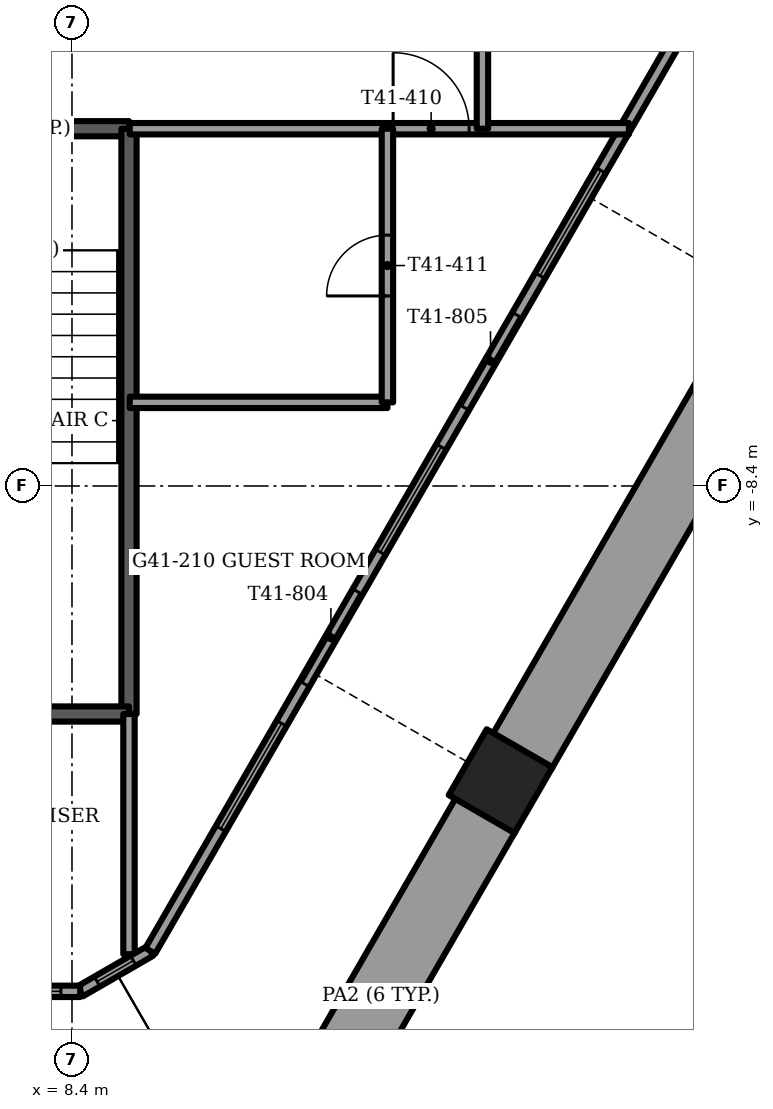
"""IFC4 building model, lengths in metres.
Left out: names, types, materials, properties, quantities, classifications, styles, units other than length and angle.
Written with IfcOpenShell. Run it as: python <this file> out.ifc"""

import sys

from ifc_helpers import new_model, si_unit, direction, frame, frame_2d, origin, origin_2d, place, context, subcontext, project, spatial, rectangle, extrude, element, fill, save


model = new_model("IFC4")
c1 = context("Model", 3, precision=1e-05, world=origin(), true_north=direction((0.0, 1.0)))
c2 = subcontext(c1, "Body", "Model", "MODEL_VIEW")
j1 = project(units=[si_unit("LENGTHUNIT", "METRE"), si_unit("PLANEANGLEUNIT", "RADIAN")], contexts=[c1])
p1 = place(None, origin())
s1 = spatial("IfcSite", under=j1, at=p1, CompositionType="ELEMENT")
p2 = place(p1, origin())
s2 = spatial("IfcBuilding", under=s1, at=p2, CompositionType="ELEMENT")
p3 = place(p2, frame((0.0, 0.0, 168.25)))
s3 = spatial("IfcBuildingStorey", under=s2, at=p3, CompositionType="ELEMENT", Elevation=168.25)
p4 = place(p3, frame((14.039, -12.283, -1.2), z_axis=(0.0, 0.0, 1.0), x_axis=(-0.5, -0.866025403784, 0.0)))
e1 = element("IfcColumn", 1, at=p4, inside=s3, PredefinedType="COLUMN", context=c2, shape_type="SweptSolid", body=[
    extrude(rectangle(XDim=1.0, YDim=1.0, at=origin_2d()), origin(), (0.0, 0.0, 1.0), 3.75),
])
p5 = place(p3, frame((11.083, -17.504, 0.0), z_axis=(0.0, 0.0, 1.0), x_axis=(0.499961976493, 0.866047355554, 0.0)))
e2 = element("IfcWall", 2, at=p5, inside=s3, PredefinedType="PARAPET", context=c2, shape_type="SweptSolid", body=[
    extrude(rectangle(XDim=5.529, YDim=0.9, at=frame_2d((2.765, 0.0))), origin(), (0.0, 0.0, 1.0), 1.1),
])
p6 = place(p3, frame((14.317, -11.901, 0.0), z_axis=(0.0, 0.0, 1.0), x_axis=(0.500013351051, 0.866017695414, 0.0)))
e3 = element("IfcWall", 3, at=p6, inside=s3, PredefinedType="PARAPET", context=c2, shape_type="SweptSolid", body=[
    extrude(rectangle(XDim=6.296, YDim=0.9, at=frame_2d((3.148, 0.0))), origin(), (0.0, 0.0, 1.0), 1.1),
])
p7 = place(p3, frame((-8.508, -15.049, 0.0), z_axis=(0.0, 0.0, 1.0), x_axis=(1.0, 0.0, 0.0)))
e4 = element("IfcWall", 4, at=p7, inside=s3, PredefinedType="SOLIDWALL", context=c2, shape_type="SweptSolid", body=[
    extrude(rectangle(XDim=17.016, YDim=0.15, at=frame_2d((8.508, 0.0))), origin(), (0.0, 0.0, 1.0), 3.45),
])
p8 = place(p7, frame((3.058, 0.0, 0.15)))
e5 = element("IfcOpeningElement", 5, at=p8, cuts=e4, PredefinedType="OPENING", context=c2, shape_type="SweptSolid", body=[
    extrude(rectangle(XDim=1.6, YDim=2.85, at=frame_2d((0.8, 1.425))), frame((0.0, 0.075, 0.0), z_axis=(0.0, -1.0, 0.0), x_axis=(1.0, 0.0, 0.0)), (0.0, 0.0, 1.0), 0.15),
])
p9 = place(p7, frame((4.708, 0.0, 0.0)))
e6 = element("IfcOpeningElement", 6, at=p9, cuts=e4, PredefinedType="OPENING", context=c2, shape_type="SweptSolid", body=[
    extrude(rectangle(XDim=1.4, YDim=2.4, at=frame_2d((0.7, 1.2))), frame((0.0, 0.075, 0.0), z_axis=(0.0, -1.0, 0.0), x_axis=(1.0, 0.0, 0.0)), (0.0, 0.0, 1.0), 0.15),
])
p10 = place(p7, frame((7.958, 0.0, 0.15)))
e7 = element("IfcOpeningElement", 7, at=p10, cuts=e4, PredefinedType="OPENING", context=c2, shape_type="SweptSolid", body=[
    extrude(rectangle(XDim=0.9, YDim=2.85, at=frame_2d((0.45, 1.425))), frame((0.0, 0.075, 0.0), z_axis=(0.0, -1.0, 0.0), x_axis=(1.0, 0.0, 0.0)), (0.0, 0.0, 1.0), 0.15),
])
p11 = place(p7, frame((12.358, 0.0, 0.15)))
e8 = element("IfcOpeningElement", 8, at=p11, cuts=e4, PredefinedType="OPENING", context=c2, shape_type="SweptSolid", body=[
    extrude(rectangle(XDim=1.6, YDim=2.85, at=frame_2d((0.8, 1.425))), frame((0.0, 0.075, 0.0), z_axis=(0.0, -1.0, 0.0), x_axis=(1.0, 0.0, 0.0)), (0.0, 0.0, 1.0), 0.15),
])
p12 = place(p7, frame((0.254, 0.0, 0.15)))
e9 = element("IfcOpeningElement", 9, at=p12, cuts=e4, PredefinedType="OPENING", context=c2, shape_type="SweptSolid", body=[
    extrude(rectangle(XDim=1.6, YDim=2.73, at=frame_2d((0.8, 1.365))), frame((0.0, 0.075, 0.0), z_axis=(0.0, -1.0, 0.0), x_axis=(1.0, 0.0, 0.0)), (0.0, 0.0, 1.0), 0.15),
])
p13 = place(p7, frame((15.162, 0.0, 0.15)))
e10 = element("IfcOpeningElement", 10, at=p13, cuts=e4, PredefinedType="OPENING", context=c2, shape_type="SweptSolid", body=[
    extrude(rectangle(XDim=1.6, YDim=2.73, at=frame_2d((0.8, 1.365))), frame((0.0, 0.075, 0.0), z_axis=(0.0, -1.0, 0.0), x_axis=(1.0, 0.0, 0.0)), (0.0, 0.0, 1.0), 0.15),
])
p14 = place(p3, frame((9.43, -14.516, 0.0), z_axis=(0.0, 0.0, 1.0), x_axis=(0.500004460396, 0.866022828558, 0.0)))
e11 = element("IfcWall", 11, at=p14, inside=s3, PredefinedType="SOLIDWALL", context=c2, shape_type="SweptSolid", body=[
    extrude(rectangle(XDim=15.712, YDim=0.15, at=frame_2d((7.856, 0.0))), origin(), (0.0, 0.0, 1.0), 3.45),
])
p15 = place(p14, frame((1.856, 0.0, 0.15)))
e12 = element("IfcOpeningElement", 12, at=p15, cuts=e11, PredefinedType="OPENING", context=c2, shape_type="SweptSolid", body=[
    extrude(rectangle(XDim=1.6, YDim=2.85, at=frame_2d((0.8, 1.425))), frame((0.0, 0.075, 0.0), z_axis=(0.0, -1.0, 0.0), x_axis=(1.0, 0.0, 0.0)), (0.0, 0.0, 1.0), 0.15),
])
p16 = place(p14, frame((4.056, 0.0, 0.0)))
e13 = element("IfcOpeningElement", 13, at=p16, cuts=e11, PredefinedType="OPENING", context=c2, shape_type="SweptSolid", body=[
    extrude(rectangle(XDim=1.4, YDim=2.4, at=frame_2d((0.7, 1.2))), frame((0.0, 0.075, 0.0), z_axis=(0.0, -1.0, 0.0), x_axis=(1.0, 0.0, 0.0)), (0.0, 0.0, 1.0), 0.15),
])
p17 = place(p14, frame((6.056, 0.0, 0.15)))
e14 = element("IfcOpeningElement", 14, at=p17, cuts=e11, PredefinedType="OPENING", context=c2, shape_type="SweptSolid", body=[
    extrude(rectangle(XDim=1.6, YDim=2.85, at=frame_2d((0.8, 1.425))), frame((0.0, 0.075, 0.0), z_axis=(0.0, -1.0, 0.0), x_axis=(1.0, 0.0, 0.0)), (0.0, 0.0, 1.0), 0.15),
])
p18 = place(p14, frame((8.256, 0.0, 0.0)))
e15 = element("IfcOpeningElement", 15, at=p18, cuts=e11, PredefinedType="OPENING", context=c2, shape_type="SweptSolid", body=[
    extrude(rectangle(XDim=1.4, YDim=2.4, at=frame_2d((0.7, 1.2))), frame((0.0, 0.075, 0.0), z_axis=(0.0, -1.0, 0.0), x_axis=(1.0, 0.0, 0.0)), (0.0, 0.0, 1.0), 0.15),
])
p19 = place(p14, frame((10.256, 0.0, 0.15)))
e16 = element("IfcOpeningElement", 16, at=p19, cuts=e11, PredefinedType="OPENING", context=c2, shape_type="SweptSolid", body=[
    extrude(rectangle(XDim=1.6, YDim=2.85, at=frame_2d((0.8, 1.425))), frame((0.0, 0.075, 0.0), z_axis=(0.0, -1.0, 0.0), x_axis=(1.0, 0.0, 0.0)), (0.0, 0.0, 1.0), 0.15),
])
p20 = place(p3, frame((8.508, -15.049, 0.0), z_axis=(0.0, 0.0, 1.0), x_axis=(0.866048165231, 0.499960573946, 0.0)))
e17 = element("IfcWall", 17, at=p20, inside=s3, PredefinedType="SOLIDWALL", context=c2, shape_type="SweptSolid", body=[
    extrude(rectangle(XDim=1.065, YDim=0.15, at=frame_2d((0.532, 0.0))), origin(), (0.0, 0.0, 1.0), 3.45),
])
p21 = place(p20, frame((0.258, 0.0, 0.15)))
e18 = element("IfcOpeningElement", 18, at=p21, cuts=e17, PredefinedType="OPENING", context=c2, shape_type="SweptSolid", body=[
    extrude(rectangle(XDim=0.55, YDim=2.85, at=frame_2d((0.275, 1.425))), frame((0.0, 0.075, 0.0), z_axis=(0.0, -1.0, 0.0), x_axis=(1.0, 0.0, 0.0)), (0.0, 0.0, 1.0), 0.15),
])
p22 = place(p3, frame((5.8, -3.7, -0.3), z_axis=(0.0, 0.0, 1.0), x_axis=(1.0, 0.0, 0.0)))
e19 = element("IfcWall", 19, at=p22, inside=s3, PredefinedType="SOLIDWALL", context=c2, shape_type="SweptSolid", body=[
    extrude(rectangle(XDim=3.35, YDim=0.2, at=frame_2d((1.675, 0.0))), origin(), (0.0, 0.0, 1.0), 3.75),
])
p23 = place(p22, frame((1.125, 0.0, 0.0)))
e20 = element("IfcOpeningElement", 20, at=p23, cuts=e19, PredefinedType="OPENING", context=c2, shape_type="SweptSolid", body=[
    extrude(rectangle(XDim=1.1, YDim=2.1, at=frame_2d((0.55, 1.05))), frame((0.0, 0.1, 0.0), z_axis=(0.0, -1.0, 0.0), x_axis=(1.0, 0.0, 0.0)), (0.0, 0.0, 1.0), 0.2),
])
p24 = place(p3, frame((9.15, -3.7, -0.3), z_axis=(0.0, 0.0, 1.0), x_axis=(0.0, -1.0, 0.0)))
e21 = element("IfcWall", 21, at=p24, inside=s3, PredefinedType="SOLIDWALL", context=c2, shape_type="SweptSolid", body=[
    extrude(rectangle(XDim=7.7, YDim=0.2, at=frame_2d((3.85, 0.0))), origin(), (0.0, 0.0, 1.0), 3.75),
])
p25 = place(p3, frame((5.8, -11.4, -0.3), z_axis=(0.0, 0.0, 1.0), x_axis=(1.0, 0.0, 0.0)))
e22 = element("IfcWall", 22, at=p25, inside=s3, PredefinedType="SOLIDWALL", context=c2, shape_type="SweptSolid", body=[
    extrude(rectangle(XDim=3.35, YDim=0.2, at=frame_2d((1.675, 0.0))), origin(), (0.0, 0.0, 1.0), 3.75),
])
p26 = place(p3, frame((9.15, -11.4, 0.0), z_axis=(0.0, 0.0, 1.0), x_axis=(0.0, -1.0, 0.0)))
e23 = element("IfcWall", 23, at=p26, inside=s3, PredefinedType="PARTITIONING", context=c2, shape_type="SweptSolid", body=[
    extrude(rectangle(XDim=3.16, YDim=0.15, at=frame_2d((1.58, 0.0))), origin(), (0.0, 0.0, 1.0), 3.45),
])
p27 = place(p3, frame((9.16, -7.3, 0.0), z_axis=(0.0, 0.0, 1.0), x_axis=(1.0, 0.0, 0.0)))
e24 = element("IfcWall", 24, at=p27, inside=s3, PredefinedType="PARTITIONING", context=c2, shape_type="SweptSolid", body=[
    extrude(rectangle(XDim=3.39, YDim=0.15, at=frame_2d((1.695, 0.0))), origin(), (0.0, 0.0, 1.0), 3.45),
])
p28 = place(p3, frame((9.16, -3.7, 0.0), z_axis=(0.0, 0.0, 1.0), x_axis=(1.0, 0.0, 0.0)))
e25 = element("IfcWall", 25, at=p28, inside=s3, PredefinedType="PARTITIONING", context=c2, shape_type="SweptSolid", body=[
    extrude(rectangle(XDim=6.567, YDim=0.15, at=frame_2d((3.284, 0.0))), origin(), (0.0, 0.0, 1.0), 3.45),
])
p29 = place(p28, frame((3.465, 0.0, 0.0)))
e26 = element("IfcOpeningElement", 26, at=p29, cuts=e25, PredefinedType="OPENING", context=c2, shape_type="SweptSolid", body=[
    extrude(rectangle(XDim=1.0, YDim=2.1, at=frame_2d((0.5, 1.05))), frame((0.0, 0.075, 0.0), z_axis=(0.0, -1.0, 0.0), x_axis=(1.0, 0.0, 0.0)), (0.0, 0.0, 1.0), 0.15),
])
p30 = place(p3, frame((13.8, -3.7, 0.0), z_axis=(0.0, 0.0, 1.0), x_axis=(0.0, 1.0, 0.0)))
e27 = element("IfcWall", 27, at=p30, inside=s3, PredefinedType="PARTITIONING", context=c2, shape_type="SweptSolid", body=[
    extrude(rectangle(XDim=2.0, YDim=0.15, at=frame_2d((1.0, 0.0))), origin(), (0.0, 0.0, 1.0), 3.45),
])
p31 = place(p3, frame((12.55, -7.3, 0.0), z_axis=(0.0, 0.0, 1.0), x_axis=(0.0, 1.0, 0.0)))
e28 = element("IfcWall", 28, at=p31, inside=s3, PredefinedType="PARTITIONING", context=c2, shape_type="SweptSolid", body=[
    extrude(rectangle(XDim=3.6, YDim=0.15, at=frame_2d((1.8, 0.0))), origin(), (0.0, 0.0, 1.0), 3.45),
])
p32 = place(p31, frame((1.4, 0.0, 0.0)))
e29 = element("IfcOpeningElement", 29, at=p32, cuts=e28, PredefinedType="OPENING", context=c2, shape_type="SweptSolid", body=[
    extrude(rectangle(XDim=0.8, YDim=2.1, at=frame_2d((0.4, 1.05))), frame((0.0, 0.075, 0.0), z_axis=(0.0, -1.0, 0.0), x_axis=(1.0, 0.0, 0.0)), (0.0, 0.0, 1.0), 0.15),
])
p33 = place(p13, origin())
e30 = element("IfcWindow", 30, at=p33, inside=s3, PartitioningType="SINGLE_PANEL", PredefinedType="WINDOW", context=c2, shape_type="SweptSolid", body=[
    extrude(rectangle(XDim=1.6, YDim=2.73, at=frame_2d((0.8, 1.365))), frame((0.0, 0.03, 0.0), z_axis=(0.0, -1.0, 0.0), x_axis=(1.0, 0.0, 0.0)), (0.0, 0.0, 1.0), 0.06),
])
fill(e10, e30)
p34 = place(p15, origin())
e31 = element("IfcWindow", 31, at=p34, inside=s3, PartitioningType="SINGLE_PANEL", PredefinedType="WINDOW", context=c2, shape_type="SweptSolid", body=[
    extrude(rectangle(XDim=1.6, YDim=2.85, at=frame_2d((0.8, 1.425))), frame((0.0, 0.03, 0.0), z_axis=(0.0, -1.0, 0.0), x_axis=(1.0, 0.0, 0.0)), (0.0, 0.0, 1.0), 0.06),
])
fill(e12, e31)
p35 = place(p16, origin())
e32 = element("IfcDoor", 32, at=p35, inside=s3, OperationType="SLIDING_TO_LEFT", PredefinedType="DOOR", context=c2, shape_type="SweptSolid", body=[
    extrude(rectangle(XDim=1.4, YDim=2.4, at=frame_2d((0.7, 1.2))), frame((0.0, 0.025, 0.0), z_axis=(0.0, -1.0, 0.0), x_axis=(1.0, 0.0, 0.0)), (0.0, 0.0, 1.0), 0.05),
])
fill(e13, e32)
p36 = place(p17, origin())
e33 = element("IfcWindow", 33, at=p36, inside=s3, PartitioningType="SINGLE_PANEL", PredefinedType="WINDOW", context=c2, shape_type="SweptSolid", body=[
    extrude(rectangle(XDim=1.6, YDim=2.85, at=frame_2d((0.8, 1.425))), frame((0.0, 0.03, 0.0), z_axis=(0.0, -1.0, 0.0), x_axis=(1.0, 0.0, 0.0)), (0.0, 0.0, 1.0), 0.06),
])
fill(e14, e33)
p37 = place(p18, origin())
e34 = element("IfcDoor", 34, at=p37, inside=s3, OperationType="SLIDING_TO_RIGHT", PredefinedType="DOOR", context=c2, shape_type="SweptSolid", body=[
    extrude(rectangle(XDim=1.4, YDim=2.4, at=frame_2d((0.7, 1.2))), frame((0.0, 0.025, 0.0), z_axis=(0.0, -1.0, 0.0), x_axis=(1.0, 0.0, 0.0)), (0.0, 0.0, 1.0), 0.05),
])
fill(e15, e34)
p38 = place(p19, origin())
e35 = element("IfcWindow", 35, at=p38, inside=s3, PartitioningType="SINGLE_PANEL", PredefinedType="WINDOW", context=c2, shape_type="SweptSolid", body=[
    extrude(rectangle(XDim=1.6, YDim=2.85, at=frame_2d((0.8, 1.425))), frame((0.0, 0.03, 0.0), z_axis=(0.0, -1.0, 0.0), x_axis=(1.0, 0.0, 0.0)), (0.0, 0.0, 1.0), 0.06),
])
fill(e16, e35)
p39 = place(p21, origin())
e36 = element("IfcWindow", 36, at=p39, inside=s3, PartitioningType="SINGLE_PANEL", PredefinedType="WINDOW", context=c2, shape_type="SweptSolid", body=[
    extrude(rectangle(XDim=0.55, YDim=2.85, at=frame_2d((0.275, 1.425))), frame((0.0, 0.03, 0.0), z_axis=(0.0, -1.0, 0.0), x_axis=(1.0, 0.0, 0.0)), (0.0, 0.0, 1.0), 0.06),
])
fill(e18, e36)
p40 = place(p29, origin())
e37 = element("IfcDoor", 37, at=p40, inside=s3, OperationType="SINGLE_SWING_RIGHT", PredefinedType="DOOR", context=c2, shape_type="SweptSolid", body=[
    extrude(rectangle(XDim=1.0, YDim=2.1, at=frame_2d((0.5, 1.05))), frame((0.0, 0.025, 0.0), z_axis=(0.0, -1.0, 0.0), x_axis=(1.0, 0.0, 0.0)), (0.0, 0.0, 1.0), 0.05),
])
fill(e26, e37)
p41 = place(p32, origin())
e38 = element("IfcDoor", 38, at=p41, inside=s3, OperationType="SINGLE_SWING_RIGHT", PredefinedType="DOOR", context=c2, shape_type="SweptSolid", body=[
    extrude(rectangle(XDim=0.8, YDim=2.1, at=frame_2d((0.4, 1.05))), frame((0.0, 0.025, 0.0), z_axis=(0.0, -1.0, 0.0), x_axis=(1.0, 0.0, 0.0)), (0.0, 0.0, 1.0), 0.05),
])
fill(e29, e38)
save(model, sys.argv[1])
